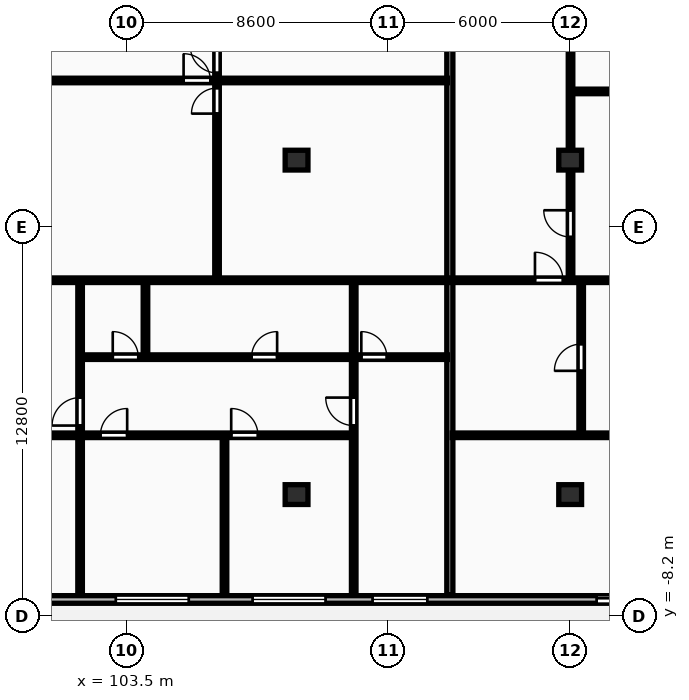
"""IFC4 building model, lengths in metres.
Left out: names, types, materials, properties, quantities, classifications, styles, units other than length and angle.
Written with IfcOpenShell. Run it as: python <this file> out.ifc"""

import sys

from ifc_helpers import new_model, si_unit, direction, frame, frame_2d, origin, origin_2d, place, context, subcontext, project, spatial, rectangle, extrude, element, fill, save


model = new_model("IFC4")
c1 = context("Model", 3, precision=1e-05, world=origin(), true_north=direction((0.0, 1.0)))
c2 = subcontext(c1, "Body", "Model", "MODEL_VIEW")
j1 = project(units=[si_unit("LENGTHUNIT", "METRE"), si_unit("PLANEANGLEUNIT", "RADIAN")], contexts=[c1])
p1 = place(None, origin())
s1 = spatial("IfcSite", under=j1, at=p1, CompositionType="ELEMENT")
p2 = place(p1, origin())
s2 = spatial("IfcBuilding", under=s1, at=p2, CompositionType="ELEMENT")
p3 = place(p2, frame((0.0, 0.0, 201.1)))
s3 = spatial("IfcBuildingStorey", under=s2, at=p3, CompositionType="ELEMENT", Elevation=201.1)
for number, where, z_axis, x_axis in (
    (1, (109.1, -4.2, 0.0), (0.0, 0.0, 1.0), (1.0, 0.0, 0.0)),
    (2, (109.1, 6.8, 0.0), (0.0, 0.0, 1.0), (1.0, 0.0, 0.0)),
    (3, (118.1, -4.2, 0.0), (0.0, 0.0, 1.0), (1.0, 0.0, 0.0)),
    (4, (118.1, 6.8, 0.0), (0.0, 0.0, 1.0), (1.0, 0.0, 0.0)),
):
    element("IfcColumn", number, at=place(p3, frame(where, z_axis=z_axis, x_axis=x_axis)), inside=s3, PredefinedType="COLUMN", context=c2, shape_type="SweptSolid", body=[
        extrude(rectangle(XDim=0.75, YDim=0.65, at=origin_2d()), origin(), (0.0, 0.0, 1.0), 3.25),
    ])
p4 = place(p3, frame((74.5, -7.65, 0.0), z_axis=(0.0, 0.0, 1.0), x_axis=(1.0, 0.0, 0.0)))
e5 = element("IfcWall", 5, at=p4, inside=s3, PredefinedType="STANDARD", context=c2, shape_type="SweptSolid", body=[
    extrude(rectangle(XDim=54.4, YDim=0.25, at=frame_2d((27.2, 0.0))), origin(), (0.0, 0.0, 1.0), 2.97),
])
p5 = place(p4, frame((3.604, 0.0, 0.0)))
e6 = element("IfcOpeningElement", 6, at=p5, cuts=e5, PredefinedType="OPENING", context=c2, shape_type="SweptSolid", body=[
    extrude(rectangle(XDim=1.8, YDim=2.2, at=frame_2d((0.9, 1.1))), frame((0.0, 0.135, 0.0), z_axis=(0.0, -1.0, 0.0), x_axis=(1.0, 0.0, 0.0)), (0.0, 0.0, 1.0), 0.27),
])
p6 = place(p4, frame((13.492, 0.0, 0.85)))
e7 = element("IfcOpeningElement", 7, at=p6, cuts=e5, PredefinedType="OPENING", context=c2, shape_type="SweptSolid", body=[
    extrude(rectangle(XDim=2.4, YDim=1.9, at=frame_2d((1.2, 0.95))), frame((0.0, 0.135, 0.0), z_axis=(0.0, -1.0, 0.0), x_axis=(1.0, 0.0, 0.0)), (0.0, 0.0, 1.0), 0.27),
])
p7 = place(p4, frame((28.655, 0.0, 0.85)))
e8 = element("IfcOpeningElement", 8, at=p7, cuts=e5, PredefinedType="OPENING", context=c2, shape_type="SweptSolid", body=[
    extrude(rectangle(XDim=2.4, YDim=1.9, at=frame_2d((1.2, 0.95))), frame((0.0, 0.135, 0.0), z_axis=(0.0, -1.0, 0.0), x_axis=(1.0, 0.0, 0.0)), (0.0, 0.0, 1.0), 0.27),
])
p8 = place(p4, frame((33.155, 0.0, 0.85)))
e9 = element("IfcOpeningElement", 9, at=p8, cuts=e5, PredefinedType="OPENING", context=c2, shape_type="SweptSolid", body=[
    extrude(rectangle(XDim=2.4, YDim=1.9, at=frame_2d((1.2, 0.95))), frame((0.0, 0.135, 0.0), z_axis=(0.0, -1.0, 0.0), x_axis=(1.0, 0.0, 0.0)), (0.0, 0.0, 1.0), 0.27),
])
p9 = place(p4, frame((23.208, 0.0, 0.0)))
e10 = element("IfcOpeningElement", 10, at=p9, cuts=e5, PredefinedType="OPENING", context=c2, shape_type="SweptSolid", body=[
    extrude(rectangle(XDim=1.8, YDim=2.2, at=frame_2d((0.9, 1.1))), frame((0.0, 0.135, 0.0), z_axis=(0.0, -1.0, 0.0), x_axis=(1.0, 0.0, 0.0)), (0.0, 0.0, 1.0), 0.27),
])
p10 = place(p4, frame((37.101, 0.0, 0.85)))
e11 = element("IfcOpeningElement", 11, at=p10, cuts=e5, PredefinedType="OPENING", context=c2, shape_type="SweptSolid", body=[
    extrude(rectangle(XDim=1.8, YDim=1.8, at=frame_2d((0.9, 0.9))), frame((0.0, 0.135, 0.0), z_axis=(0.0, -1.0, 0.0), x_axis=(1.0, 0.0, 0.0)), (0.0, 0.0, 1.0), 0.27),
])
p11 = place(p4, frame((44.471, 0.0, 0.0)))
e12 = element("IfcOpeningElement", 12, at=p11, cuts=e5, PredefinedType="OPENING", context=c2, shape_type="SweptSolid", body=[
    extrude(rectangle(XDim=1.8, YDim=2.2, at=frame_2d((0.9, 1.1))), frame((0.0, 0.135, 0.0), z_axis=(0.0, -1.0, 0.0), x_axis=(1.0, 0.0, 0.0)), (0.0, 0.0, 1.0), 0.27),
])
p12 = place(p4, frame((51.73, 0.0, 0.85)))
e13 = element("IfcOpeningElement", 13, at=p12, cuts=e5, PredefinedType="OPENING", context=c2, shape_type="SweptSolid", body=[
    extrude(rectangle(XDim=1.8, YDim=1.8, at=frame_2d((0.9, 0.9))), frame((0.0, 0.135, 0.0), z_axis=(0.0, -1.0, 0.0), x_axis=(1.0, 0.0, 0.0)), (0.0, 0.0, 1.0), 0.27),
])
p13 = place(p3, frame((114.142, -7.5, 0.0), z_axis=(0.0, 0.0, 1.0), x_axis=(0.0, 1.0, 0.0)))
e14 = element("IfcWall", 14, at=p13, inside=s3, PredefinedType="PARTITIONING", context=c2, shape_type="SweptSolid", body=[
    extrude(rectangle(XDim=23.07, YDim=0.2, at=frame_2d((11.535, 0.0))), origin(), (0.0, 0.0, 1.0), 2.97),
])
p14 = place(p3, frame((106.484, 2.89, 0.0), z_axis=(0.0, 0.0, 1.0), x_axis=(0.0, 1.0, 0.0)))
e15 = element("IfcWall", 15, at=p14, inside=s3, PredefinedType="PARTITIONING", context=c2, shape_type="SweptSolid", body=[
    extrude(rectangle(XDim=12.7, YDim=0.15, at=frame_2d((6.35, 0.0))), origin(), (0.0, 0.0, 1.0), 2.97),
])
p15 = place(p14, frame((5.44, 0.0, 0.0)))
e16 = element("IfcOpeningElement", 16, at=p15, cuts=e15, PredefinedType="OPENING", context=c2, shape_type="SweptSolid", body=[
    extrude(rectangle(XDim=0.84, YDim=2.04, at=frame_2d((0.42, 1.02))), frame((0.0, 0.085, 0.0), z_axis=(0.0, -1.0, 0.0), x_axis=(1.0, 0.0, 0.0)), (0.0, 0.0, 1.0), 0.17),
])
p16 = place(p14, frame((6.78, 0.0, 0.0)))
e17 = element("IfcOpeningElement", 17, at=p16, cuts=e15, PredefinedType="OPENING", context=c2, shape_type="SweptSolid", body=[
    extrude(rectangle(XDim=0.88, YDim=2.06, at=frame_2d((0.44, 1.03))), frame((0.0, 0.085, 0.0), z_axis=(0.0, -1.0, 0.0), x_axis=(1.0, 0.0, 0.0)), (0.0, 0.0, 1.0), 0.17),
])
p17 = place(p3, frame((99.147, 9.42, 0.0), z_axis=(0.0, 0.0, 1.0), x_axis=(1.0, 0.0, 0.0)))
e18 = element("IfcWall", 18, at=p17, inside=s3, PredefinedType="PARTITIONING", context=c2, shape_type="SweptSolid", body=[
    extrude(rectangle(XDim=14.915, YDim=0.15, at=frame_2d((7.458, 0.0))), origin(), (0.0, 0.0, 1.0), 2.97),
])
p18 = place(p17, frame((6.238, 0.0, 0.0)))
e19 = element("IfcOpeningElement", 19, at=p18, cuts=e18, PredefinedType="OPENING", context=c2, shape_type="SweptSolid", body=[
    extrude(rectangle(XDim=0.88, YDim=2.06, at=frame_2d((0.44, 1.03))), frame((0.0, 0.085, 0.0), z_axis=(0.0, -1.0, 0.0), x_axis=(1.0, 0.0, 0.0)), (0.0, 0.0, 1.0), 0.17),
])
p19 = place(p3, frame((104.13, 0.34, 0.0), z_axis=(0.0, 0.0, 1.0), x_axis=(0.0, 1.0, 0.0)))
e20 = element("IfcWall", 20, at=p19, inside=s3, PredefinedType="PARTITIONING", context=c2, shape_type="SweptSolid", body=[
    extrude(rectangle(XDim=2.47, YDim=0.15, at=frame_2d((1.235, 0.0))), origin(), (0.0, 0.0, 1.0), 2.97),
])
p20 = place(p3, frame((106.73, -7.5, 0.0), z_axis=(0.0, 0.0, 1.0), x_axis=(0.0, 1.0, 0.0)))
e21 = element("IfcWall", 21, at=p20, inside=s3, PredefinedType="PARTITIONING", context=c2, shape_type="SweptSolid", body=[
    extrude(rectangle(XDim=5.17, YDim=0.15, at=frame_2d((2.585, 0.0))), origin(), (0.0, 0.0, 1.0), 2.97),
])
p21 = place(p3, frame((101.98, -7.5, 0.0), z_axis=(0.0, 0.0, 1.0), x_axis=(0.0, 1.0, 0.0)))
e22 = element("IfcWall", 22, at=p21, inside=s3, PredefinedType="PARTITIONING", context=c2, shape_type="SweptSolid", body=[
    extrude(rectangle(XDim=10.31, YDim=0.15, at=frame_2d((5.155, 0.0))), origin(), (0.0, 0.0, 1.0), 2.97),
])
p22 = place(p21, frame((5.57, 0.0, 0.0)))
e23 = element("IfcOpeningElement", 23, at=p22, cuts=e22, PredefinedType="OPENING", context=c2, shape_type="SweptSolid", body=[
    extrude(rectangle(XDim=0.92, YDim=2.08, at=frame_2d((0.46, 1.04))), frame((0.0, 0.085, 0.0), z_axis=(0.0, -1.0, 0.0), x_axis=(1.0, 0.0, 0.0)), (0.0, 0.0, 1.0), 0.17),
])
p23 = place(p3, frame((110.98, 0.34, 0.0), z_axis=(0.0, 0.0, 1.0), x_axis=(0.0, 1.0, 0.0)))
e24 = element("IfcWall", 24, at=p23, inside=s3, PredefinedType="PARTITIONING", context=c2, shape_type="SweptSolid", body=[
    extrude(rectangle(XDim=2.47, YDim=0.15, at=frame_2d((1.235, 0.0))), origin(), (0.0, 0.0, 1.0), 2.97),
])
p24 = place(p3, frame((110.98, -7.5, 0.0), z_axis=(0.0, 0.0, 1.0), x_axis=(0.0, 1.0, 0.0)))
e25 = element("IfcWall", 25, at=p24, inside=s3, PredefinedType="PARTITIONING", context=c2, shape_type="SweptSolid", body=[
    extrude(rectangle(XDim=7.8, YDim=0.15, at=frame_2d((3.9, 0.0))), origin(), (0.0, 0.0, 1.0), 2.97),
])
p25 = place(p24, frame((5.57, 0.0, 0.0)))
e26 = element("IfcOpeningElement", 26, at=p25, cuts=e25, PredefinedType="OPENING", context=c2, shape_type="SweptSolid", body=[
    extrude(rectangle(XDim=0.92, YDim=2.08, at=frame_2d((0.46, 1.04))), frame((0.0, 0.085, 0.0), z_axis=(0.0, -1.0, 0.0), x_axis=(1.0, 0.0, 0.0)), (0.0, 0.0, 1.0), 0.17),
])
p26 = place(p3, frame((102.02, 0.32, 0.0), z_axis=(0.0, 0.0, 1.0), x_axis=(1.0, 0.0, 0.0)))
e27 = element("IfcWall", 27, at=p26, inside=s3, PredefinedType="PARTITIONING", context=c2, shape_type="SweptSolid", body=[
    extrude(rectangle(XDim=12.042, YDim=0.15, at=frame_2d((6.021, 0.0))), origin(), (0.0, 0.0, 1.0), 2.97),
])
p27 = place(p26, frame((1.034, 0.0, 0.0)))
e28 = element("IfcOpeningElement", 28, at=p27, cuts=e27, PredefinedType="OPENING", context=c2, shape_type="SweptSolid", body=[
    extrude(rectangle(XDim=0.84, YDim=2.04, at=frame_2d((0.42, 1.02))), frame((0.0, 0.085, 0.0), z_axis=(0.0, -1.0, 0.0), x_axis=(1.0, 0.0, 0.0)), (0.0, 0.0, 1.0), 0.17),
])
p28 = place(p26, frame((5.601, 0.0, 0.0)))
e29 = element("IfcOpeningElement", 29, at=p28, cuts=e27, PredefinedType="OPENING", context=c2, shape_type="SweptSolid", body=[
    extrude(rectangle(XDim=0.84, YDim=2.04, at=frame_2d((0.42, 1.02))), frame((0.0, 0.085, 0.0), z_axis=(0.0, -1.0, 0.0), x_axis=(1.0, 0.0, 0.0)), (0.0, 0.0, 1.0), 0.17),
])
p29 = place(p26, frame((9.21, 0.0, 0.0)))
e30 = element("IfcOpeningElement", 30, at=p29, cuts=e27, PredefinedType="OPENING", context=c2, shape_type="SweptSolid", body=[
    extrude(rectangle(XDim=0.84, YDim=2.04, at=frame_2d((0.42, 1.02))), frame((0.0, 0.085, 0.0), z_axis=(0.0, -1.0, 0.0), x_axis=(1.0, 0.0, 0.0)), (0.0, 0.0, 1.0), 0.17),
])
p30 = place(p3, frame((95.197, 2.85, 0.0), z_axis=(0.0, 0.0, 1.0), x_axis=(1.0, 0.0, 0.0)))
e31 = element("IfcWall", 31, at=p30, inside=s3, PredefinedType="PARTITIONING", context=c2, shape_type="SweptSolid", body=[
    extrude(rectangle(XDim=18.865, YDim=0.15, at=frame_2d((9.433, 0.0))), origin(), (0.0, 0.0, 1.0), 2.97),
])
p31 = place(p30, frame((2.72, 0.0, 0.0)))
e32 = element("IfcOpeningElement", 32, at=p31, cuts=e31, PredefinedType="OPENING", context=c2, shape_type="SweptSolid", body=[
    extrude(rectangle(XDim=0.92, YDim=2.08, at=frame_2d((0.46, 1.04))), frame((0.0, 0.085, 0.0), z_axis=(0.0, -1.0, 0.0), x_axis=(1.0, 0.0, 0.0)), (0.0, 0.0, 1.0), 0.17),
])
p32 = place(p3, frame((95.197, -2.25, 0.0), z_axis=(0.0, 0.0, 1.0), x_axis=(1.0, 0.0, 0.0)))
e33 = element("IfcWall", 33, at=p32, inside=s3, PredefinedType="PARTITIONING", context=c2, shape_type="SweptSolid", body=[
    extrude(rectangle(XDim=15.783, YDim=0.15, at=frame_2d((7.892, 0.0))), origin(), (0.0, 0.0, 1.0), 2.97),
])
p33 = place(p32, frame((2.387, 0.0, 0.0)))
e34 = element("IfcOpeningElement", 34, at=p33, cuts=e33, PredefinedType="OPENING", context=c2, shape_type="SweptSolid", body=[
    extrude(rectangle(XDim=0.94, YDim=2.1, at=frame_2d((0.47, 1.05))), frame((0.0, 0.085, 0.0), z_axis=(0.0, -1.0, 0.0), x_axis=(1.0, 0.0, 0.0)), (0.0, 0.0, 1.0), 0.17),
])
p34 = place(p32, frame((7.452, 0.0, 0.0)))
e35 = element("IfcOpeningElement", 35, at=p34, cuts=e33, PredefinedType="OPENING", context=c2, shape_type="SweptSolid", body=[
    extrude(rectangle(XDim=0.88, YDim=2.06, at=frame_2d((0.44, 1.03))), frame((0.0, 0.085, 0.0), z_axis=(0.0, -1.0, 0.0), x_axis=(1.0, 0.0, 0.0)), (0.0, 0.0, 1.0), 0.17),
])
p35 = place(p32, frame((11.753, 0.0, 0.0)))
e36 = element("IfcOpeningElement", 36, at=p35, cuts=e33, PredefinedType="OPENING", context=c2, shape_type="SweptSolid", body=[
    extrude(rectangle(XDim=0.88, YDim=2.06, at=frame_2d((0.44, 1.03))), frame((0.0, 0.085, 0.0), z_axis=(0.0, -1.0, 0.0), x_axis=(1.0, 0.0, 0.0)), (0.0, 0.0, 1.0), 0.17),
])
p36 = place(p3, frame((118.172, 9.06, 0.0), z_axis=(0.0, 0.0, 1.0), x_axis=(1.0, 0.0, 0.0)))
e37 = element("IfcWall", 37, at=p36, inside=s3, PredefinedType="PARTITIONING", context=c2, shape_type="SweptSolid", body=[
    extrude(rectangle(XDim=10.648, YDim=0.15, at=frame_2d((5.324, 0.0))), origin(), (0.0, 0.0, 1.0), 2.97),
])
p37 = place(p36, frame((2.973, 0.0, 0.0)))
e38 = element("IfcOpeningElement", 38, at=p37, cuts=e37, PredefinedType="OPENING", context=c2, shape_type="SweptSolid", body=[
    extrude(rectangle(XDim=0.88, YDim=2.06, at=frame_2d((0.44, 1.03))), frame((0.0, 0.085, 0.0), z_axis=(0.0, -1.0, 0.0), x_axis=(1.0, 0.0, 0.0)), (0.0, 0.0, 1.0), 0.17),
])
p38 = place(p3, frame((118.112, 2.89, 0.0), z_axis=(0.0, 0.0, 1.0), x_axis=(0.0, 1.0, 0.0)))
e39 = element("IfcWall", 39, at=p38, inside=s3, PredefinedType="PARTITIONING", context=c2, shape_type="SweptSolid", body=[
    extrude(rectangle(XDim=12.7, YDim=0.15, at=frame_2d((6.35, 0.0))), origin(), (0.0, 0.0, 1.0), 2.2),
])
p39 = place(p38, frame((1.382, 0.0, 0.0)))
e40 = element("IfcOpeningElement", 40, at=p39, cuts=e39, PredefinedType="OPENING", context=c2, shape_type="SweptSolid", body=[
    extrude(rectangle(XDim=0.88, YDim=2.06, at=frame_2d((0.44, 1.03))), frame((0.0, 0.085, 0.0), z_axis=(0.0, -1.0, 0.0), x_axis=(1.0, 0.0, 0.0)), (0.0, 0.0, 1.0), 0.17),
])
p40 = place(p3, frame((118.462, -2.19, 0.0), z_axis=(0.0, 0.0, 1.0), x_axis=(0.0, 1.0, 0.0)))
e41 = element("IfcWall", 41, at=p40, inside=s3, PredefinedType="PARTITIONING", context=c2, shape_type="SweptSolid", body=[
    extrude(rectangle(XDim=5.0, YDim=0.15, at=frame_2d((2.5, 0.0))), origin(), (0.0, 0.0, 1.0), 2.97),
])
p41 = place(p40, frame((2.06, 0.0, 0.0)))
e42 = element("IfcOpeningElement", 42, at=p41, cuts=e41, PredefinedType="OPENING", context=c2, shape_type="SweptSolid", body=[
    extrude(rectangle(XDim=0.88, YDim=2.06, at=frame_2d((0.44, 1.03))), frame((0.0, 0.085, 0.0), z_axis=(0.0, -1.0, 0.0), x_axis=(1.0, 0.0, 0.0)), (0.0, 0.0, 1.0), 0.17),
])
p42 = place(p3, frame((114.222, 2.85, 0.0), z_axis=(0.0, 0.0, 1.0), x_axis=(1.0, 0.0, 0.0)))
e43 = element("IfcWall", 43, at=p42, inside=s3, PredefinedType="PARTITIONING", context=c2, shape_type="SweptSolid", body=[
    extrude(rectangle(XDim=14.598, YDim=0.15, at=frame_2d((7.299, 0.0))), origin(), (0.0, 0.0, 1.0), 2.97),
])
p43 = place(p42, frame((2.72, 0.0, 0.0)))
e44 = element("IfcOpeningElement", 44, at=p43, cuts=e43, PredefinedType="OPENING", context=c2, shape_type="SweptSolid", body=[
    extrude(rectangle(XDim=0.92, YDim=2.08, at=frame_2d((0.46, 1.04))), frame((0.0, 0.085, 0.0), z_axis=(0.0, -1.0, 0.0), x_axis=(1.0, 0.0, 0.0)), (0.0, 0.0, 1.0), 0.17),
])
p44 = place(p3, frame((114.222, -2.25, 0.0), z_axis=(0.0, 0.0, 1.0), x_axis=(1.0, 0.0, 0.0)))
e45 = element("IfcWall", 45, at=p44, inside=s3, PredefinedType="PARTITIONING", context=c2, shape_type="SweptSolid", body=[
    extrude(rectangle(XDim=14.598, YDim=0.15, at=frame_2d((7.299, 0.0))), origin(), (0.0, 0.0, 1.0), 2.97),
])
p45 = place(p44, frame((6.829, 0.0, 0.0)))
e46 = element("IfcOpeningElement", 46, at=p45, cuts=e45, PredefinedType="OPENING", context=c2, shape_type="SweptSolid", body=[
    extrude(rectangle(XDim=0.94, YDim=2.1, at=frame_2d((0.47, 1.05))), frame((0.0, 0.085, 0.0), z_axis=(0.0, -1.0, 0.0), x_axis=(1.0, 0.0, 0.0)), (0.0, 0.0, 1.0), 0.17),
])
p46 = place(p7, origin())
e47 = element("IfcWindow", 47, at=p46, inside=s3, PartitioningType="DOUBLE_PANEL_VERTICAL", PredefinedType="WINDOW", context=c2, shape_type="SweptSolid", body=[
    extrude(rectangle(XDim=2.4, YDim=1.9, at=frame_2d((1.2, 0.95))), frame((0.0, 0.03, 0.0), z_axis=(0.0, -1.0, 0.0), x_axis=(1.0, 0.0, 0.0)), (0.0, 0.0, 1.0), 0.06),
])
fill(e8, e47)
p47 = place(p8, origin())
e48 = element("IfcWindow", 48, at=p47, inside=s3, PartitioningType="DOUBLE_PANEL_VERTICAL", PredefinedType="WINDOW", context=c2, shape_type="SweptSolid", body=[
    extrude(rectangle(XDim=2.4, YDim=1.9, at=frame_2d((1.2, 0.95))), frame((0.0, 0.03, 0.0), z_axis=(0.0, -1.0, 0.0), x_axis=(1.0, 0.0, 0.0)), (0.0, 0.0, 1.0), 0.06),
])
fill(e9, e48)
p48 = place(p10, origin())
e49 = element("IfcWindow", 49, at=p48, inside=s3, PartitioningType="SINGLE_PANEL", PredefinedType="WINDOW", context=c2, shape_type="SweptSolid", body=[
    extrude(rectangle(XDim=1.8, YDim=1.8, at=frame_2d((0.9, 0.9))), frame((0.0, 0.03, 0.0), z_axis=(0.0, -1.0, 0.0), x_axis=(1.0, 0.0, 0.0)), (0.0, 0.0, 1.0), 0.06),
])
fill(e11, e49)
p49 = place(p11, origin())
e50 = element("IfcDoor", 50, at=p49, inside=s3, OperationType="SLIDING_TO_RIGHT", PredefinedType="DOOR", context=c2, shape_type="SweptSolid", body=[
    extrude(rectangle(XDim=1.8, YDim=2.2, at=frame_2d((0.9, 1.1))), frame((0.0, 0.025, 0.0), z_axis=(0.0, -1.0, 0.0), x_axis=(1.0, 0.0, 0.0)), (0.0, 0.0, 1.0), 0.05),
])
fill(e12, e50)
p50 = place(p15, origin())
e51 = element("IfcDoor", 51, at=p50, inside=s3, OperationType="SINGLE_SWING_LEFT", PredefinedType="DOOR", context=c2, shape_type="SweptSolid", body=[
    extrude(rectangle(XDim=0.84, YDim=2.04, at=frame_2d((0.42, 1.02))), frame((0.0, 0.025, 0.0), z_axis=(0.0, -1.0, 0.0), x_axis=(1.0, 0.0, 0.0)), (0.0, 0.0, 1.0), 0.05),
])
fill(e16, e51)
p51 = place(p16, origin())
e52 = element("IfcDoor", 52, at=p51, inside=s3, OperationType="SINGLE_SWING_RIGHT", PredefinedType="DOOR", context=c2, shape_type="SweptSolid", body=[
    extrude(rectangle(XDim=0.88, YDim=2.06, at=frame_2d((0.44, 1.03))), frame((0.0, 0.025, 0.0), z_axis=(0.0, -1.0, 0.0), x_axis=(1.0, 0.0, 0.0)), (0.0, 0.0, 1.0), 0.05),
])
fill(e17, e52)
p52 = place(p18, origin())
e53 = element("IfcDoor", 53, at=p52, inside=s3, OperationType="SINGLE_SWING_LEFT", PredefinedType="DOOR", context=c2, shape_type="SweptSolid", body=[
    extrude(rectangle(XDim=0.88, YDim=2.06, at=frame_2d((0.44, 1.03))), frame((0.0, 0.025, 0.0), z_axis=(0.0, -1.0, 0.0), x_axis=(1.0, 0.0, 0.0)), (0.0, 0.0, 1.0), 0.05),
])
fill(e19, e53)
p53 = place(p22, origin())
e54 = element("IfcDoor", 54, at=p53, inside=s3, OperationType="SINGLE_SWING_LEFT", PredefinedType="DOOR", context=c2, shape_type="SweptSolid", body=[
    extrude(rectangle(XDim=0.92, YDim=2.08, at=frame_2d((0.46, 1.04))), frame((0.0, 0.025, 0.0), z_axis=(0.0, -1.0, 0.0), x_axis=(1.0, 0.0, 0.0)), (0.0, 0.0, 1.0), 0.05),
])
fill(e23, e54)
p54 = place(p25, origin())
e55 = element("IfcDoor", 55, at=p54, inside=s3, OperationType="SINGLE_SWING_RIGHT", PredefinedType="DOOR", context=c2, shape_type="SweptSolid", body=[
    extrude(rectangle(XDim=0.92, YDim=2.08, at=frame_2d((0.46, 1.04))), frame((0.0, 0.025, 0.0), z_axis=(0.0, -1.0, 0.0), x_axis=(1.0, 0.0, 0.0)), (0.0, 0.0, 1.0), 0.05),
])
fill(e26, e55)
p55 = place(p27, origin())
e56 = element("IfcDoor", 56, at=p55, inside=s3, OperationType="SINGLE_SWING_LEFT", PredefinedType="DOOR", context=c2, shape_type="SweptSolid", body=[
    extrude(rectangle(XDim=0.84, YDim=2.04, at=frame_2d((0.42, 1.02))), frame((0.0, 0.025, 0.0), z_axis=(0.0, -1.0, 0.0), x_axis=(1.0, 0.0, 0.0)), (0.0, 0.0, 1.0), 0.05),
])
fill(e28, e56)
p56 = place(p28, origin())
e57 = element("IfcDoor", 57, at=p56, inside=s3, OperationType="SINGLE_SWING_RIGHT", PredefinedType="DOOR", context=c2, shape_type="SweptSolid", body=[
    extrude(rectangle(XDim=0.84, YDim=2.04, at=frame_2d((0.42, 1.02))), frame((0.0, 0.025, 0.0), z_axis=(0.0, -1.0, 0.0), x_axis=(1.0, 0.0, 0.0)), (0.0, 0.0, 1.0), 0.05),
])
fill(e29, e57)
p57 = place(p29, origin())
e58 = element("IfcDoor", 58, at=p57, inside=s3, OperationType="SINGLE_SWING_LEFT", PredefinedType="DOOR", context=c2, shape_type="SweptSolid", body=[
    extrude(rectangle(XDim=0.84, YDim=2.04, at=frame_2d((0.42, 1.02))), frame((0.0, 0.025, 0.0), z_axis=(0.0, -1.0, 0.0), x_axis=(1.0, 0.0, 0.0)), (0.0, 0.0, 1.0), 0.05),
])
fill(e30, e58)
p58 = place(p34, origin())
e59 = element("IfcDoor", 59, at=p58, inside=s3, OperationType="SINGLE_SWING_RIGHT", PredefinedType="DOOR", context=c2, shape_type="SweptSolid", body=[
    extrude(rectangle(XDim=0.88, YDim=2.06, at=frame_2d((0.44, 1.03))), frame((0.0, 0.025, 0.0), z_axis=(0.0, -1.0, 0.0), x_axis=(1.0, 0.0, 0.0)), (0.0, 0.0, 1.0), 0.05),
])
fill(e35, e59)
p59 = place(p35, origin())
e60 = element("IfcDoor", 60, at=p59, inside=s3, OperationType="SINGLE_SWING_LEFT", PredefinedType="DOOR", context=c2, shape_type="SweptSolid", body=[
    extrude(rectangle(XDim=0.88, YDim=2.06, at=frame_2d((0.44, 1.03))), frame((0.0, 0.025, 0.0), z_axis=(0.0, -1.0, 0.0), x_axis=(1.0, 0.0, 0.0)), (0.0, 0.0, 1.0), 0.05),
])
fill(e36, e60)
p60 = place(p39, origin())
e61 = element("IfcDoor", 61, at=p60, inside=s3, OperationType="SINGLE_SWING_RIGHT", PredefinedType="DOOR", context=c2, shape_type="SweptSolid", body=[
    extrude(rectangle(XDim=0.88, YDim=2.06, at=frame_2d((0.44, 1.03))), frame((0.0, 0.025, 0.0), z_axis=(0.0, -1.0, 0.0), x_axis=(1.0, 0.0, 0.0)), (0.0, 0.0, 1.0), 0.05),
])
fill(e40, e61)
p61 = place(p41, origin())
e62 = element("IfcDoor", 62, at=p61, inside=s3, OperationType="SINGLE_SWING_LEFT", PredefinedType="DOOR", context=c2, shape_type="SweptSolid", body=[
    extrude(rectangle(XDim=0.88, YDim=2.06, at=frame_2d((0.44, 1.03))), frame((0.0, 0.025, 0.0), z_axis=(0.0, -1.0, 0.0), x_axis=(1.0, 0.0, 0.0)), (0.0, 0.0, 1.0), 0.05),
])
fill(e42, e62)
p62 = place(p43, origin())
e63 = element("IfcDoor", 63, at=p62, inside=s3, OperationType="SINGLE_SWING_LEFT", PredefinedType="DOOR", context=c2, shape_type="SweptSolid", body=[
    extrude(rectangle(XDim=0.92, YDim=2.08, at=frame_2d((0.46, 1.04))), frame((0.0, 0.025, 0.0), z_axis=(0.0, -1.0, 0.0), x_axis=(1.0, 0.0, 0.0)), (0.0, 0.0, 1.0), 0.05),
])
fill(e44, e63)
save(model, sys.argv[1])
